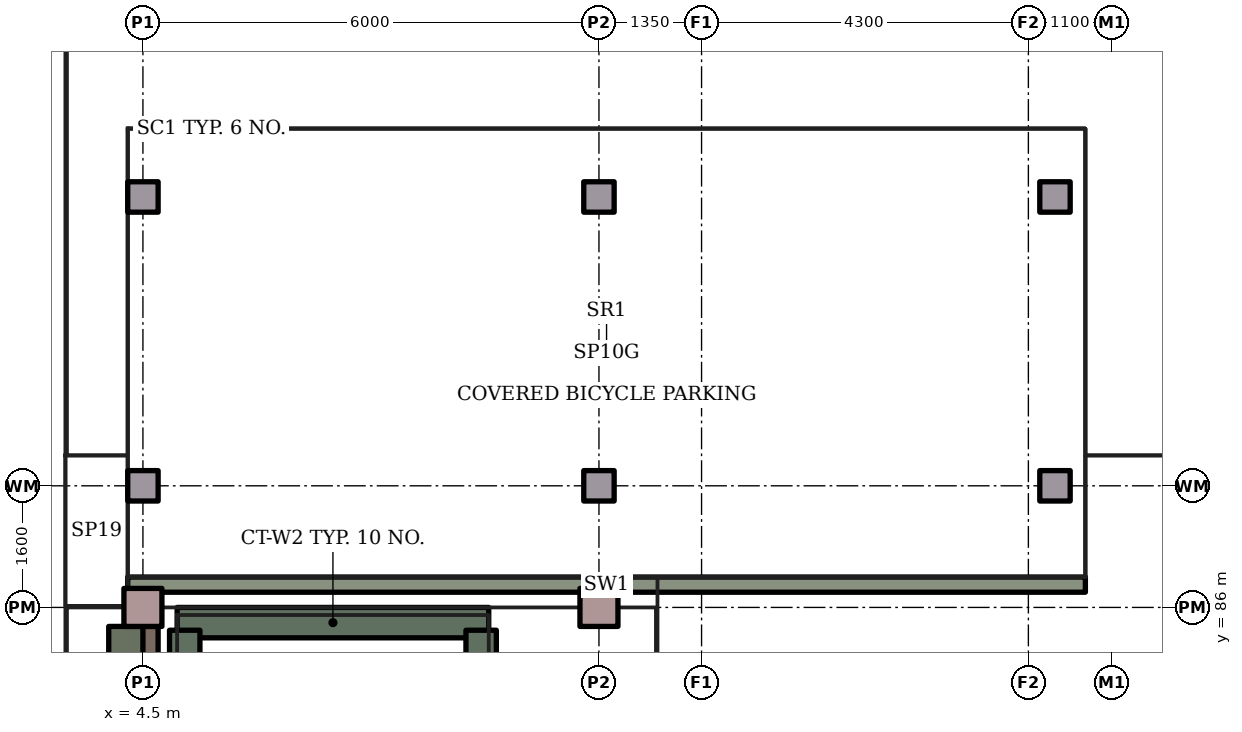
"""IFC4 building model, lengths in metres.
Left out: names, types, materials, properties, quantities, classifications, styles, units other than length and angle.
Written with IfcOpenShell. Run it as: python <this file> out.ifc"""

import sys

from ifc_helpers import new_model, si_unit, direction, frame, frame_2d, origin, origin_2d, place, context, subcontext, project, spatial, rectangle, extrude, element, save


model = new_model("IFC4")
c1 = context("Model", 3, precision=1e-05, world=origin(), true_north=direction((0.0, 1.0)))
c2 = subcontext(c1, "Body", "Model", "MODEL_VIEW")
j1 = project(units=[si_unit("LENGTHUNIT", "METRE"), si_unit("PLANEANGLEUNIT", "RADIAN")], contexts=[c1])
p1 = place(None, origin())
s1 = spatial("IfcSite", under=j1, at=p1, CompositionType="ELEMENT")
p2 = place(p1, origin())
s2 = spatial("IfcBuilding", under=s1, at=p2, CompositionType="ELEMENT")
p3 = place(p2, origin())
s3 = spatial("IfcBuildingStorey", under=s2, at=p3, CompositionType="ELEMENT", Elevation=0.0)
for number, where, z_axis, x_axis in (
    (1, (4.5, 86.0, 0.0), (0.0, 0.0, 1.0), (1.0, 0.0, 0.0)),
    (2, (10.5, 86.0, 0.0), (0.0, 0.0, 1.0), (1.0, 0.0, 0.0)),
):
    element("IfcColumn", number, at=place(p3, frame(where, z_axis=z_axis, x_axis=x_axis)), inside=s3, PredefinedType="COLUMN", context=c2, shape_type="SweptSolid", body=[
        extrude(rectangle(XDim=0.5, YDim=0.5, at=origin_2d()), origin(), (0.0, 0.0, 1.0), 3.95),
    ])
p4 = place(p3, frame((4.5, 80.25, 3.3), z_axis=(0.0, 0.0, 1.0), x_axis=(0.0, 1.0, 0.0)))
e3 = element("IfcWall", 3, at=p4, inside=s3, PredefinedType="STANDARD", context=c2, shape_type="SweptSolid", body=[
    extrude(rectangle(XDim=5.5, YDim=0.4, at=frame_2d((2.75, 0.0))), origin(), (0.0, 0.0, 1.0), 0.65),
])
p5 = place(p3, frame((4.275, 85.75, 0.0), z_axis=(0.0, 0.0, 1.0), x_axis=(0.0, -1.0, 0.0)))
e4 = element("IfcWall", 4, at=p5, inside=s3, PredefinedType="STANDARD", context=c2, shape_type="SweptSolid", body=[
    extrude(rectangle(XDim=0.6, YDim=0.45, at=frame_2d((0.3, 0.0))), origin(), (0.0, 0.0, 1.0), 1.9),
])
p6 = place(p3, frame((4.95, 85.8, 0.0), z_axis=(0.0, 0.0, 1.0), x_axis=(1.0, 0.0, 0.0)))
e5 = element("IfcWall", 5, at=p6, inside=s3, PredefinedType="SHEAR", context=c2, shape_type="SweptSolid", body=[
    extrude(rectangle(XDim=4.1, YDim=0.4, at=frame_2d((2.05, 0.0))), origin(), (0.0, 0.0, 1.0), 1.9),
])
for number, where, z_axis, x_axis in (
    (6, (5.05, 84.4, 0.0), (0.0, 0.0, 1.0), (0.0, 1.0, 0.0)),
    (7, (8.95, 84.4, 0.0), (0.0, 0.0, 1.0), (0.0, 1.0, 0.0)),
):
    element("IfcWall", number, at=place(p3, frame(where, z_axis=z_axis, x_axis=x_axis)), inside=s3, PredefinedType="SHEAR", context=c2, shape_type="SweptSolid", body=[
        extrude(rectangle(XDim=1.3, YDim=0.4, at=frame_2d((0.65, 0.0))), origin(), (0.0, 0.0, 1.0), 1.9),
    ])
for number, where, z_axis, x_axis in (
    (8, (4.5, 87.6, 0.0), (0.0, 0.0, 1.0), (1.0, 0.0, 0.0)),
    (9, (10.5, 87.6, 0.0), (0.0, 0.0, 1.0), (1.0, 0.0, 0.0)),
    (10, (16.5, 87.6, 0.0), (0.0, 0.0, 1.0), (1.0, 0.0, 0.0)),
    (11, (4.5, 91.4, 0.0), (0.0, 0.0, 1.0), (1.0, 0.0, 0.0)),
    (12, (10.5, 91.4, 0.0), (0.0, 0.0, 1.0), (1.0, 0.0, 0.0)),
    (13, (16.5, 91.4, 0.0), (0.0, 0.0, 1.0), (1.0, 0.0, 0.0)),
):
    element("IfcColumn", number, at=place(p3, frame(where, z_axis=z_axis, x_axis=x_axis)), inside=s3, PredefinedType="COLUMN", context=c2, shape_type="SweptSolid", body=[
        extrude(rectangle(XDim=0.4, YDim=0.4, at=origin_2d()), origin(), (0.0, 0.0, 1.0), 2.6),
    ])
p7 = place(p3, frame((4.3, 86.3, 0.0), z_axis=(0.0, 0.0, 1.0), x_axis=(1.0, 0.0, 0.0)))
e14 = element("IfcWall", 14, at=p7, inside=s3, PredefinedType="SOLIDWALL", context=c2, shape_type="SweptSolid", body=[
    extrude(rectangle(XDim=12.6, YDim=0.2, at=frame_2d((6.3, 0.0))), origin(), (0.0, 0.0, 1.0), 2.6),
])
save(model, sys.argv[1])
